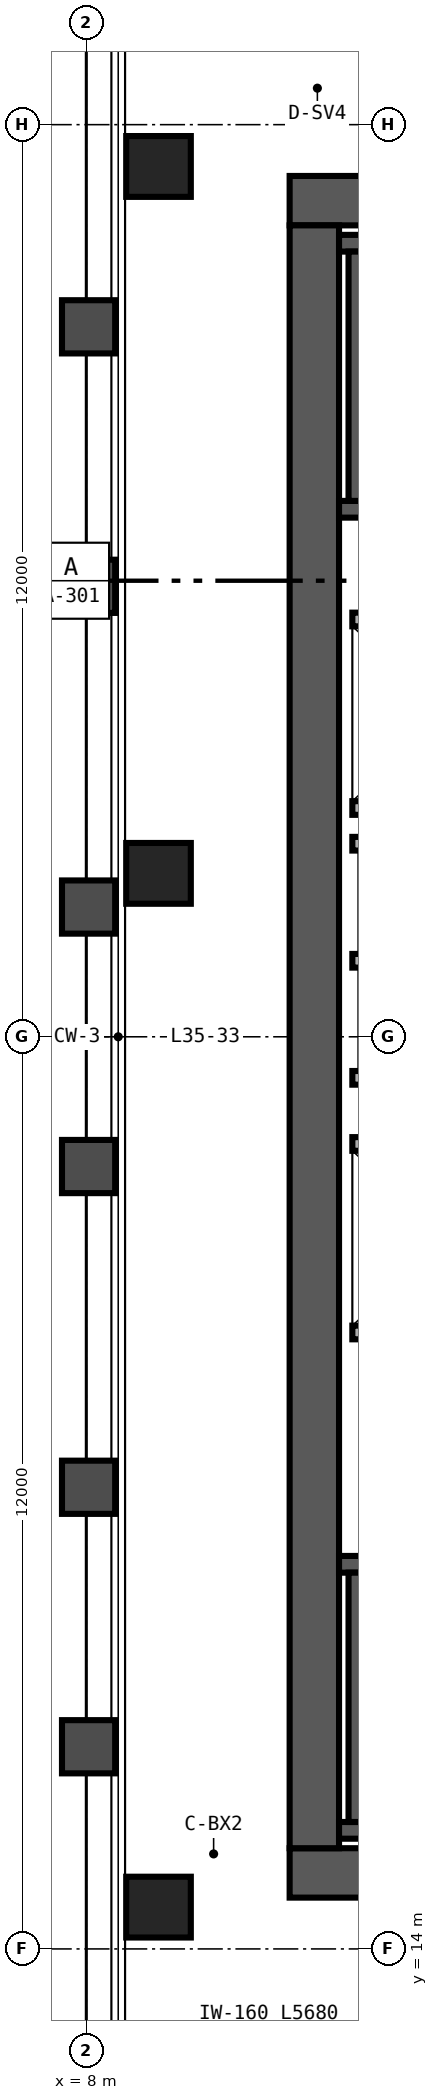
"""IFC4 building model, lengths in metres.
Left out: names, types, materials, properties, quantities, classifications, styles, units other than length and angle.
Written with IfcOpenShell. Run it as: python <this file> out.ifc"""

import sys

from ifc_helpers import new_model, si_unit, direction, frame, frame_2d, origin, origin_2d, place, context, subcontext, project, spatial, rectangle, hollow_rectangle, extrude, source, transform, mapped, element, save


model = new_model("IFC4")
c1 = context("Model", 3, precision=1e-05, world=origin(), true_north=direction((0.0, 1.0)))
c2 = subcontext(c1, "Body", "Model", "MODEL_VIEW")
j1 = project(units=[si_unit("LENGTHUNIT", "METRE"), si_unit("PLANEANGLEUNIT", "RADIAN")], contexts=[c1])
p1 = place(None, origin())
s1 = spatial("IfcSite", under=j1, at=p1, CompositionType="ELEMENT")
p2 = place(p1, origin())
s2 = spatial("IfcBuilding", under=s1, at=p2, CompositionType="ELEMENT")
p3 = place(p2, frame((0.0, 0.0, 140.4)))
s3 = spatial("IfcBuildingStorey", under=s2, at=p3, CompositionType="ELEMENT", Elevation=140.4)
p4 = place(p3, frame((10.675, 15.0, 0.0), z_axis=(0.0, 0.0, 1.0), x_axis=(1.0, 0.0, 0.0)))
e1 = element("IfcWall", 1, at=p4, inside=s3, PredefinedType="SHEAR", context=c2, shape_type="SweptSolid", body=[
    extrude(rectangle(XDim=12.65, YDim=0.65, at=frame_2d((6.325, 0.0))), origin(), (0.0, 0.0, 1.0), 3.36),
])
p5 = place(p4, frame((8.905, 0.0, 0.0)))
e2 = element("IfcOpeningElement", 2, at=p5, cuts=e1, PredefinedType="OPENING", context=c2, shape_type="SweptSolid", body=[
    extrude(rectangle(XDim=1.0, YDim=2.15, at=frame_2d((0.5, 1.075))), frame((0.0, 0.335, 0.0), z_axis=(0.0, -1.0, 0.0), x_axis=(1.0, 0.0, 0.0)), (0.0, 0.0, 1.0), 0.67),
])
p6 = place(p3, frame((10.675, 37.0, 0.0), z_axis=(0.0, 0.0, 1.0), x_axis=(1.0, 0.0, 0.0)))
e3 = element("IfcWall", 3, at=p6, inside=s3, PredefinedType="SHEAR", context=c2, shape_type="SweptSolid", body=[
    extrude(rectangle(XDim=12.65, YDim=0.65, at=frame_2d((6.325, 0.0))), origin(), (0.0, 0.0, 1.0), 3.36),
])
p7 = place(p6, frame((8.905, 0.0, 0.0)))
e4 = element("IfcOpeningElement", 4, at=p7, cuts=e3, PredefinedType="OPENING", context=c2, shape_type="SweptSolid", body=[
    extrude(rectangle(XDim=1.0, YDim=2.15, at=frame_2d((0.5, 1.075))), frame((0.0, 0.335, 0.0), z_axis=(0.0, -1.0, 0.0), x_axis=(1.0, 0.0, 0.0)), (0.0, 0.0, 1.0), 0.67),
])
p8 = place(p3, frame((11.0, 15.325, 0.0), z_axis=(0.0, 0.0, 1.0), x_axis=(0.0, 1.0, 0.0)))
e5 = element("IfcWall", 5, at=p8, inside=s3, PredefinedType="SHEAR", context=c2, shape_type="SweptSolid", body=[
    extrude(rectangle(XDim=21.35, YDim=0.65, at=frame_2d((10.675, 0.0))), origin(), (0.0, 0.0, 1.0), 3.36),
])
p9 = place(p3, frame((11.325, 15.56, 0.0), z_axis=(0.0, 0.0, 1.0), x_axis=(1.0, 0.0, 0.0)))
e6 = element("IfcWall", 6, at=p9, inside=s3, PredefinedType="SHEAR", context=c2, shape_type="SweptSolid", body=[
    extrude(rectangle(XDim=7.985, YDim=0.22, at=frame_2d((3.993, 0.0))), origin(), (0.0, 0.0, 1.0), 3.4),
])
p10 = place(p3, frame((11.325, 19.06, 0.0), z_axis=(0.0, 0.0, 1.0), x_axis=(1.0, 0.0, 0.0)))
e7 = element("IfcWall", 7, at=p10, inside=s3, PredefinedType="SHEAR", context=c2, shape_type="SweptSolid", body=[
    extrude(rectangle(XDim=7.985, YDim=0.22, at=frame_2d((3.993, 0.0))), origin(), (0.0, 0.0, 1.0), 3.4),
])
p11 = place(p10, frame((0.595, 0.0, 0.0)))
e8 = element("IfcOpeningElement", 8, at=p11, cuts=e7, PredefinedType="OPENING", context=c2, shape_type="SweptSolid", body=[
    extrude(rectangle(XDim=1.05, YDim=2.15, at=frame_2d((0.525, 1.075))), frame((0.0, 0.12, 0.0), z_axis=(0.0, -1.0, 0.0), x_axis=(1.0, 0.0, 0.0)), (0.0, 0.0, 1.0), 0.24),
])
p12 = place(p3, frame((11.56, 15.67, 0.0), z_axis=(0.0, 0.0, 1.0), x_axis=(0.0, 1.0, 0.0)))
e9 = element("IfcWall", 9, at=p12, inside=s3, PredefinedType="SHEAR", context=c2, shape_type="SweptSolid", body=[
    extrude(rectangle(XDim=3.28, YDim=0.22, at=frame_2d((1.64, 0.0))), origin(), (0.0, 0.0, 1.0), 3.4),
])
p13 = place(p3, frame((11.325, 32.94, 0.0), z_axis=(0.0, 0.0, 1.0), x_axis=(1.0, 0.0, 0.0)))
e10 = element("IfcWall", 10, at=p13, inside=s3, PredefinedType="SHEAR", context=c2, shape_type="SweptSolid", body=[
    extrude(rectangle(XDim=7.985, YDim=0.22, at=frame_2d((3.993, 0.0))), origin(), (0.0, 0.0, 1.0), 3.4),
])
p14 = place(p13, frame((0.595, 0.0, 0.0)))
e11 = element("IfcOpeningElement", 11, at=p14, cuts=e10, PredefinedType="OPENING", context=c2, shape_type="SweptSolid", body=[
    extrude(rectangle(XDim=1.05, YDim=2.15, at=frame_2d((0.525, 1.075))), frame((0.0, 0.12, 0.0), z_axis=(0.0, -1.0, 0.0), x_axis=(1.0, 0.0, 0.0)), (0.0, 0.0, 1.0), 0.24),
])
p15 = place(p3, frame((11.325, 36.44, 0.0), z_axis=(0.0, 0.0, 1.0), x_axis=(1.0, 0.0, 0.0)))
e12 = element("IfcWall", 12, at=p15, inside=s3, PredefinedType="SHEAR", context=c2, shape_type="SweptSolid", body=[
    extrude(rectangle(XDim=7.985, YDim=0.22, at=frame_2d((3.993, 0.0))), origin(), (0.0, 0.0, 1.0), 3.4),
])
p16 = place(p3, frame((11.56, 33.05, 0.0), z_axis=(0.0, 0.0, 1.0), x_axis=(0.0, 1.0, 0.0)))
e13 = element("IfcWall", 13, at=p16, inside=s3, PredefinedType="SHEAR", context=c2, shape_type="SweptSolid", body=[
    extrude(rectangle(XDim=3.28, YDim=0.22, at=frame_2d((1.64, 0.0))), origin(), (0.0, 0.0, 1.0), 3.4),
])
m1 = source(origin(), c2, "Body", "SweptSolid", [
    extrude(hollow_rectangle(XDim=0.85, YDim=0.8, WallThickness=0.032, at=origin_2d()), origin(), (0.0, 0.0, 1.0), 3.36),
])
for number, where, z_axis, x_axis in (
    (14, (8.95, 14.55, 0.0), (0.0, 0.0, 1.0), (1.0, 0.0, 0.0)),
    (15, (8.95, 28.15, 0.0), (0.0, 0.0, 1.0), (1.0, 0.0, 0.0)),
    (16, (8.95, 37.45, 0.0), (0.0, 0.0, 1.0), (1.0, 0.0, 0.0)),
):
    element("IfcColumn", number, at=place(p3, frame(where, z_axis=z_axis, x_axis=x_axis)), inside=s3, PredefinedType="COLUMN", context=c2, shape_type="MappedRepresentation", body=[
        mapped(m1, transform((0.0, 0.0, 0.0), scale=1.0)),
    ])
for number, where, z_axis, x_axis in (
    (17, (11.5, 22.11, 0.0), (0.0, 0.0, 1.0), (1.0, 0.0, 0.0)),
    (18, (11.5, 24.59, 0.0), (0.0, 0.0, 1.0), (1.0, 0.0, 0.0)),
    (19, (11.5, 29.01, 0.0), (0.0, 0.0, 1.0), (1.0, 0.0, 0.0)),
    (20, (11.5, 31.49, 0.0), (0.0, 0.0, 1.0), (1.0, 0.0, 0.0)),
):
    element("IfcWall", number, at=place(p3, frame(where, z_axis=z_axis, x_axis=x_axis)), inside=s3, PredefinedType="SOLIDWALL", context=c2, shape_type="SweptSolid", body=[
        extrude(rectangle(XDim=2.5, YDim=0.18, at=frame_2d((1.25, 0.0))), origin(), (0.0, 0.0, 1.0), 3.36),
    ])
for number, where, z_axis, x_axis in (
    (21, (11.5, 25.46, 0.0), (0.0, 0.0, 1.0), (1.0, 0.0, 0.0)),
    (22, (11.5, 27.0, 0.0), (0.0, 0.0, 1.0), (1.0, 0.0, 0.0)),
    (23, (11.5, 28.54, 0.0), (0.0, 0.0, 1.0), (1.0, 0.0, 0.0)),
):
    element("IfcWall", number, at=place(p3, frame(where, z_axis=z_axis, x_axis=x_axis)), inside=s3, PredefinedType="SOLIDWALL", context=c2, shape_type="SweptSolid", body=[
        extrude(rectangle(XDim=2.51, YDim=0.18, at=frame_2d((1.255, 0.0))), origin(), (0.0, 0.0, 1.0), 3.36),
    ])
save(model, sys.argv[1])
